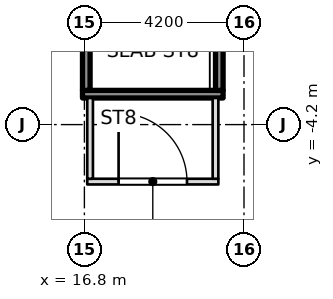
"""IFC4 building model, lengths in metres.
Left out: names, types, materials, properties, quantities, classifications, styles, units other than length and angle.
Written with IfcOpenShell. Run it as: python <this file> out.ifc"""

import sys

from ifc_helpers import new_model, si_unit, direction, frame, frame_2d, origin, place, context, subcontext, project, spatial, rectangle, extrude, element, fill, save


model = new_model("IFC4")
c1 = context("Model", 3, precision=1e-05, world=origin(), true_north=direction((0.0, 1.0)))
c2 = subcontext(c1, "Body", "Model", "MODEL_VIEW")
j1 = project(units=[si_unit("LENGTHUNIT", "METRE"), si_unit("PLANEANGLEUNIT", "RADIAN")], contexts=[c1])
p1 = place(None, origin())
s1 = spatial("IfcSite", under=j1, at=p1, CompositionType="ELEMENT")
p2 = place(p1, origin())
s2 = spatial("IfcBuilding", under=s1, at=p2, CompositionType="ELEMENT")
p3 = place(p2, frame((0.0, 0.0, -4.2)))
s3 = spatial("IfcBuildingStorey", under=s2, at=p3, CompositionType="ELEMENT", Elevation=-4.2)
p4 = place(p3, frame((16.875, -5.7, 0.0), z_axis=(0.0, 0.0, 1.0), x_axis=(1.0, 0.0, 0.0)))
e1 = element("IfcWall", 1, at=p4, inside=s3, PredefinedType="PARTITIONING", context=c2, shape_type="SweptSolid", body=[
    extrude(rectangle(XDim=3.45, YDim=0.15, at=frame_2d((1.725, 0.0))), origin(), (0.0, 0.0, 1.0), 3.75),
])
p5 = place(p4, frame((0.825, 0.0, 0.0)))
e2 = element("IfcOpeningElement", 2, at=p5, cuts=e1, PredefinedType="OPENING", context=c2, shape_type="SweptSolid", body=[
    extrude(rectangle(XDim=1.8, YDim=2.1, at=frame_2d((0.9, 1.05))), frame((0.0, 0.085, 0.0), z_axis=(0.0, -1.0, 0.0), x_axis=(1.0, 0.0, 0.0)), (0.0, 0.0, 1.0), 0.17),
])
for number, where, z_axis, x_axis in (
    (3, (16.95, -5.625, 0.0), (0.0, 0.0, 1.0), (0.0, 1.0, 0.0)),
    (4, (20.25, -5.625, 0.0), (0.0, 0.0, 1.0), (0.0, 1.0, 0.0)),
):
    element("IfcWall", number, at=place(p3, frame(where, z_axis=z_axis, x_axis=x_axis)), inside=s3, PredefinedType="PARTITIONING", context=c2, shape_type="SweptSolid", body=[
        extrude(rectangle(XDim=2.125, YDim=0.15, at=frame_2d((1.062, 0.0))), origin(), (0.0, 0.0, 1.0), 3.75),
    ])
p6 = place(p3, frame((16.75, -3.4, 0.0), z_axis=(0.0, 0.0, 1.0), x_axis=(1.0, 0.0, 0.0)))
e5 = element("IfcWall", 5, at=p6, inside=s3, PredefinedType="SOLIDWALL", context=c2, shape_type="SweptSolid", body=[
    extrude(rectangle(XDim=3.7, YDim=0.2, at=frame_2d((1.85, 0.0))), origin(), (0.0, 0.0, 1.0), 3.75),
])
p7 = place(p3, frame((16.85, -3.3, 0.0), z_axis=(0.0, 0.0, 1.0), x_axis=(0.0, 1.0, 0.0)))
e6 = element("IfcWall", 6, at=p7, inside=s3, PredefinedType="SOLIDWALL", context=c2, shape_type="SweptSolid", body=[
    extrude(rectangle(XDim=6.6, YDim=0.2, at=frame_2d((3.3, 0.0))), origin(), (0.0, 0.0, 1.0), 3.75),
])
p8 = place(p7, frame((5.1, 0.0, 0.0)))
e7 = element("IfcOpeningElement", 7, at=p8, cuts=e6, PredefinedType="OPENING", context=c2, shape_type="SweptSolid", body=[
    extrude(rectangle(XDim=1.2, YDim=2.1, at=frame_2d((0.6, 1.05))), frame((0.0, 0.11, 0.0), z_axis=(0.0, -1.0, 0.0), x_axis=(1.0, 0.0, 0.0)), (0.0, 0.0, 1.0), 0.22),
])
p9 = place(p3, frame((20.35, -3.3, 0.0), z_axis=(0.0, 0.0, 1.0), x_axis=(0.0, 1.0, 0.0)))
e8 = element("IfcWall", 8, at=p9, inside=s3, PredefinedType="SOLIDWALL", context=c2, shape_type="SweptSolid", body=[
    extrude(rectangle(XDim=6.6, YDim=0.2, at=frame_2d((3.3, 0.0))), origin(), (0.0, 0.0, 1.0), 3.75),
])
p10 = place(p5, origin())
e9 = element("IfcDoor", 9, at=p10, inside=s3, OperationType="DOUBLE_DOOR_SINGLE_SWING", PredefinedType="DOOR", context=c2, shape_type="SweptSolid", body=[
    extrude(rectangle(XDim=1.8, YDim=2.1, at=frame_2d((0.9, 1.05))), frame((0.0, 0.025, 0.0), z_axis=(0.0, -1.0, 0.0), x_axis=(1.0, 0.0, 0.0)), (0.0, 0.0, 1.0), 0.05),
])
fill(e2, e9)
save(model, sys.argv[1])
